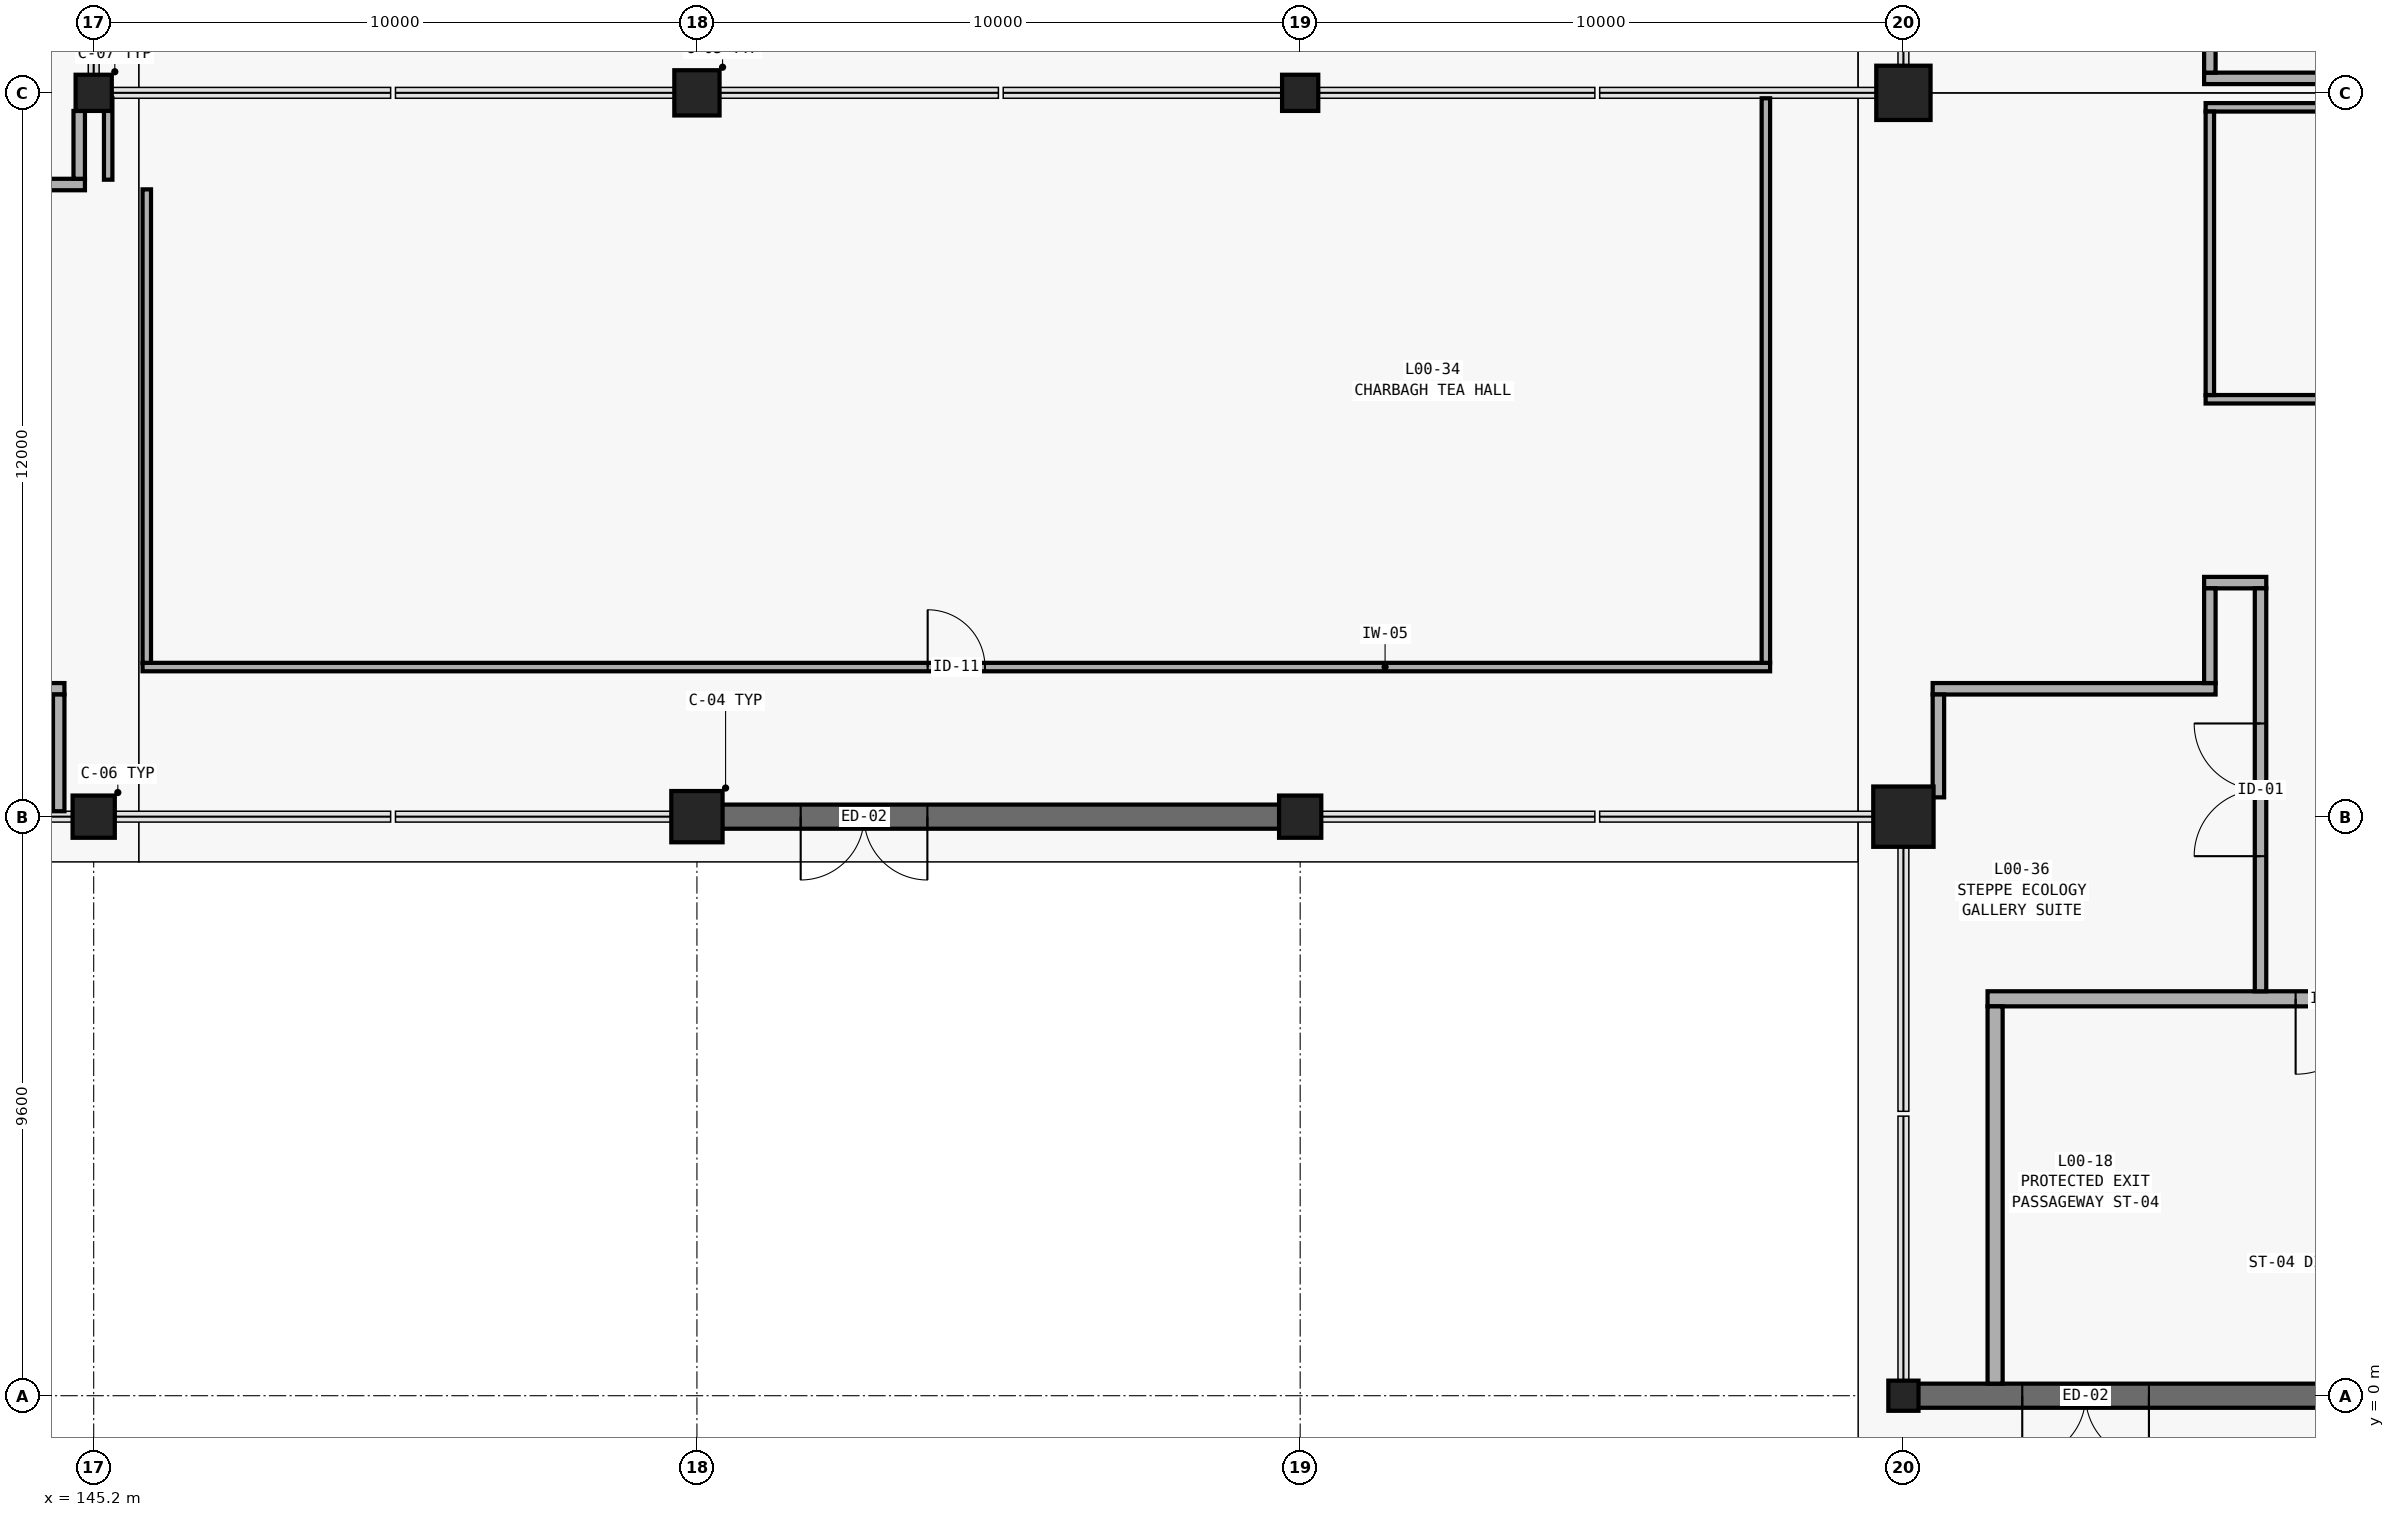
"""IFC4 building model, lengths in metres.
Left out: names, types, materials, properties, quantities, classifications, styles, units other than length and angle.
Written with IfcOpenShell. Run it as: python <this file> out.ifc"""

import sys

from ifc_helpers import new_model, si_unit, direction, frame, frame_2d, origin, origin_2d, place, context, subcontext, project, spatial, rectangle, extrude, element, fill, save


model = new_model("IFC4")
c1 = context("Model", 3, precision=1e-05, world=origin(), true_north=direction((0.0, 1.0)))
c2 = subcontext(c1, "Body", "Model", "MODEL_VIEW")
j1 = project(units=[si_unit("LENGTHUNIT", "METRE"), si_unit("PLANEANGLEUNIT", "RADIAN")], contexts=[c1])
p1 = place(None, origin())
s1 = spatial("IfcSite", under=j1, at=p1, CompositionType="ELEMENT")
p2 = place(p1, origin())
s2 = spatial("IfcBuilding", under=s1, at=p2, CompositionType="ELEMENT")
p3 = place(p2, origin())
s3 = spatial("IfcBuildingStorey", under=s2, at=p3, CompositionType="ELEMENT", Elevation=0.0)
p4 = place(p3, frame((145.2, 9.6, 0.0), z_axis=(0.0, 0.0, 1.0), x_axis=(1.0, 0.0, 0.0)))
e1 = element("IfcColumn", 1, at=p4, inside=s3, PredefinedType="COLUMN", context=c2, shape_type="SweptSolid", body=[
    extrude(rectangle(XDim=0.7, YDim=0.7, at=origin_2d()), origin(), (0.0, 0.0, 1.0), 4.8),
])
p5 = place(p3, frame((145.2, 21.6, 0.0), z_axis=(0.0, 0.0, 1.0), x_axis=(1.0, 0.0, 0.0)))
e2 = element("IfcColumn", 2, at=p5, inside=s3, PredefinedType="COLUMN", context=c2, shape_type="SweptSolid", body=[
    extrude(rectangle(XDim=0.6, YDim=0.6, at=origin_2d()), origin(), (0.0, 0.0, 1.0), 4.8),
])
p6 = place(p3, frame((155.2, 9.6, 0.0), z_axis=(0.0, 0.0, 1.0), x_axis=(1.0, 0.0, 0.0)))
e3 = element("IfcColumn", 3, at=p6, inside=s3, PredefinedType="COLUMN", context=c2, shape_type="SweptSolid", body=[
    extrude(rectangle(XDim=0.85, YDim=0.85, at=origin_2d()), origin(), (0.0, 0.0, 1.0), 4.8),
])
p7 = place(p3, frame((155.2, 21.6, 0.0), z_axis=(0.0, 0.0, 1.0), x_axis=(1.0, 0.0, 0.0)))
e4 = element("IfcColumn", 4, at=p7, inside=s3, PredefinedType="COLUMN", context=c2, shape_type="SweptSolid", body=[
    extrude(rectangle(XDim=0.75, YDim=0.75, at=origin_2d()), origin(), (0.0, 0.0, 1.0), 4.8),
])
p8 = place(p3, frame((165.2, 9.6, 0.0), z_axis=(0.0, 0.0, 1.0), x_axis=(1.0, 0.0, 0.0)))
e5 = element("IfcColumn", 5, at=p8, inside=s3, PredefinedType="COLUMN", context=c2, shape_type="SweptSolid", body=[
    extrude(rectangle(XDim=0.7, YDim=0.7, at=origin_2d()), origin(), (0.0, 0.0, 1.0), 4.8),
])
p9 = place(p3, frame((165.2, 21.6, 0.0), z_axis=(0.0, 0.0, 1.0), x_axis=(1.0, 0.0, 0.0)))
e6 = element("IfcColumn", 6, at=p9, inside=s3, PredefinedType="COLUMN", context=c2, shape_type="SweptSolid", body=[
    extrude(rectangle(XDim=0.6, YDim=0.6, at=origin_2d()), origin(), (0.0, 0.0, 1.0), 4.8),
])
p10 = place(p3, frame((175.2, 0.0, 0.0), z_axis=(0.0, 0.0, 1.0), x_axis=(1.0, 0.0, 0.0)))
e7 = element("IfcColumn", 7, at=p10, inside=s3, PredefinedType="COLUMN", context=c2, shape_type="SweptSolid", body=[
    extrude(rectangle(XDim=0.5, YDim=0.5, at=origin_2d()), origin(), (0.0, 0.0, 1.0), 4.8),
])
p11 = place(p3, frame((175.2, 9.6, 0.0), z_axis=(0.0, 0.0, 1.0), x_axis=(1.0, 0.0, 0.0)))
e8 = element("IfcColumn", 8, at=p11, inside=s3, PredefinedType="COLUMN", context=c2, shape_type="SweptSolid", body=[
    extrude(rectangle(XDim=1.0, YDim=1.0, at=origin_2d()), origin(), (0.0, 0.0, 1.0), 4.8),
])
p12 = place(p3, frame((175.2, 21.6, 0.0), z_axis=(0.0, 0.0, 1.0), x_axis=(1.0, 0.0, 0.0)))
e9 = element("IfcColumn", 9, at=p12, inside=s3, PredefinedType="COLUMN", context=c2, shape_type="SweptSolid", body=[
    extrude(rectangle(XDim=0.9, YDim=0.9, at=origin_2d()), origin(), (0.0, 0.0, 1.0), 4.8),
])
p13 = place(p3, frame((175.02, 0.0, 0.0), z_axis=(0.0, 0.0, 1.0), x_axis=(1.0, 0.0, 0.0)))
e10 = element("IfcWall", 10, at=p13, inside=s3, PredefinedType="STANDARD", context=c2, shape_type="SweptSolid", body=[
    extrude(rectangle(XDim=10.36, YDim=0.4, at=frame_2d((5.18, 0.0))), origin(), (0.0, 0.0, 1.0), 4.5),
])
p14 = place(p13, frame((2.15, 0.0, 0.0)))
e11 = element("IfcOpeningElement", 11, at=p14, cuts=e10, PredefinedType="OPENING", context=c2, shape_type="SweptSolid", body=[
    extrude(rectangle(XDim=2.1, YDim=2.6, at=frame_2d((1.05, 1.3))), frame((0.0, 0.215, 0.0), z_axis=(0.0, -1.0, 0.0), x_axis=(1.0, 0.0, 0.0)), (0.0, 0.0, 1.0), 0.43),
])
p15 = place(p3, frame((155.02, 9.6, 0.0), z_axis=(0.0, 0.0, 1.0), x_axis=(1.0, 0.0, 0.0)))
e12 = element("IfcWall", 12, at=p15, inside=s3, PredefinedType="STANDARD", context=c2, shape_type="SweptSolid", body=[
    extrude(rectangle(XDim=10.36, YDim=0.4, at=frame_2d((5.18, 0.0))), origin(), (0.0, 0.0, 1.0), 4.5),
])
p16 = place(p15, frame((1.9, 0.0, 0.0)))
e13 = element("IfcOpeningElement", 13, at=p16, cuts=e12, PredefinedType="OPENING", context=c2, shape_type="SweptSolid", body=[
    extrude(rectangle(XDim=2.1, YDim=2.6, at=frame_2d((1.05, 1.3))), frame((0.0, 0.215, 0.0), z_axis=(0.0, -1.0, 0.0), x_axis=(1.0, 0.0, 0.0)), (0.0, 0.0, 1.0), 0.43),
])
p17 = place(p3, frame((176.595, 6.58, 0.0), z_axis=(0.0, 0.0, 1.0), x_axis=(1.0, 0.0, 0.0)))
e14 = element("IfcWall", 14, at=p17, inside=s3, PredefinedType="PARTITIONING", context=c2, shape_type="SweptSolid", body=[
    extrude(rectangle(XDim=9.245, YDim=0.25, at=frame_2d((4.623, 0.0))), origin(), (0.0, 0.0, 1.0), 3.38),
])
p18 = place(p17, frame((5.107, 0.0, 0.0)))
e15 = element("IfcOpeningElement", 15, at=p18, cuts=e14, PredefinedType="OPENING", context=c2, shape_type="SweptSolid", body=[
    extrude(rectangle(XDim=1.25, YDim=2.15, at=frame_2d((0.625, 1.075))), frame((0.0, 0.14, 0.0), z_axis=(0.0, -1.0, 0.0), x_axis=(1.0, 0.0, 0.0)), (0.0, 0.0, 1.0), 0.28),
])
p19 = place(p3, frame((141.425, 11.72, 0.0), z_axis=(0.0, 0.0, 1.0), x_axis=(1.0, 0.0, 0.0)))
e16 = element("IfcWall", 16, at=p19, inside=s3, PredefinedType="PARTITIONING", context=c2, shape_type="SweptSolid", body=[
    extrude(rectangle(XDim=3.29, YDim=0.19, at=frame_2d((1.645, 0.0))), origin(), (0.0, 0.0, 1.0), 3.38),
])
p20 = place(p3, frame((175.685, 11.72, 0.0), z_axis=(0.0, 0.0, 1.0), x_axis=(1.0, 0.0, 0.0)))
e17 = element("IfcWall", 17, at=p20, inside=s3, PredefinedType="PARTITIONING", context=c2, shape_type="SweptSolid", body=[
    extrude(rectangle(XDim=4.69, YDim=0.19, at=frame_2d((2.345, 0.0))), origin(), (0.0, 0.0, 1.0), 3.38),
])
p21 = place(p3, frame((146.01, 12.08, 0.0), z_axis=(0.0, 0.0, 1.0), x_axis=(1.0, 0.0, 0.0)))
e18 = element("IfcWall", 18, at=p21, inside=s3, PredefinedType="PARTITIONING", context=c2, shape_type="SweptSolid", body=[
    extrude(rectangle(XDim=26.98, YDim=0.14, at=frame_2d((13.49, 0.0))), origin(), (0.0, 0.0, 1.0), 3.38),
])
p22 = place(p21, frame((13.015, 0.0, 0.0)))
e19 = element("IfcOpeningElement", 19, at=p22, cuts=e18, PredefinedType="OPENING", context=c2, shape_type="SweptSolid", body=[
    extrude(rectangle(XDim=0.95, YDim=2.15, at=frame_2d((0.475, 1.075))), frame((0.0, 0.085, 0.0), z_axis=(0.0, -1.0, 0.0), x_axis=(1.0, 0.0, 0.0)), (0.0, 0.0, 1.0), 0.17),
])
p23 = place(p3, frame((180.185, 13.48, 0.0), z_axis=(0.0, 0.0, 1.0), x_axis=(1.0, 0.0, 0.0)))
e20 = element("IfcWall", 20, at=p23, inside=s3, PredefinedType="PARTITIONING", context=c2, shape_type="SweptSolid", body=[
    extrude(rectangle(XDim=1.03, YDim=0.19, at=frame_2d((0.515, 0.0))), origin(), (0.0, 0.0, 1.0), 3.38),
])
p24 = place(p3, frame((180.21, 16.52, 0.0), z_axis=(0.0, 0.0, 1.0), x_axis=(1.0, 0.0, 0.0)))
e21 = element("IfcWall", 21, at=p24, inside=s3, PredefinedType="PARTITIONING", context=c2, shape_type="SweptSolid", body=[
    extrude(rectangle(XDim=20.93, YDim=0.14, at=frame_2d((10.465, 0.0))), origin(), (0.0, 0.0, 1.0), 3.38),
])
p25 = place(p24, frame((16.219, 0.0, 0.0)))
e22 = element("IfcOpeningElement", 22, at=p25, cuts=e21, PredefinedType="OPENING", context=c2, shape_type="SweptSolid", body=[
    extrude(rectangle(XDim=1.05, YDim=2.1, at=frame_2d((0.525, 1.05))), frame((0.0, 0.085, 0.0), z_axis=(0.0, -1.0, 0.0), x_axis=(1.0, 0.0, 0.0)), (0.0, 0.0, 1.0), 0.17),
])
p26 = place(p24, frame((9.965, 0.0, 0.0)))
e23 = element("IfcOpeningElement", 23, at=p26, cuts=e21, PredefinedType="OPENING", context=c2, shape_type="SweptSolid", body=[
    extrude(rectangle(XDim=1.0, YDim=2.15, at=frame_2d((0.5, 1.075))), frame((0.0, 0.085, 0.0), z_axis=(0.0, -1.0, 0.0), x_axis=(1.0, 0.0, 0.0)), (0.0, 0.0, 1.0), 0.17),
])
p27 = place(p3, frame((141.425, 20.08, 0.0), z_axis=(0.0, 0.0, 1.0), x_axis=(1.0, 0.0, 0.0)))
e24 = element("IfcWall", 24, at=p27, inside=s3, PredefinedType="PARTITIONING", context=c2, shape_type="SweptSolid", body=[
    extrude(rectangle(XDim=3.63, YDim=0.19, at=frame_2d((1.815, 0.0))), origin(), (0.0, 0.0, 1.0), 3.38),
])
p28 = place(p3, frame((180.21, 21.36, 0.0), z_axis=(0.0, 0.0, 1.0), x_axis=(1.0, 0.0, 0.0)))
e25 = element("IfcWall", 25, at=p28, inside=s3, PredefinedType="PARTITIONING", context=c2, shape_type="SweptSolid", body=[
    extrude(rectangle(XDim=4.54, YDim=0.14, at=frame_2d((2.27, 0.0))), origin(), (0.0, 0.0, 1.0), 3.38),
])
p29 = place(p3, frame((180.185, 21.84, 0.0), z_axis=(0.0, 0.0, 1.0), x_axis=(1.0, 0.0, 0.0)))
e26 = element("IfcWall", 26, at=p29, inside=s3, PredefinedType="PARTITIONING", context=c2, shape_type="SweptSolid", body=[
    extrude(rectangle(XDim=4.565, YDim=0.19, at=frame_2d((2.282, 0.0))), origin(), (0.0, 0.0, 1.0), 3.38),
])
p30 = place(p3, frame((144.62, 9.69, 0.0), z_axis=(0.0, 0.0, 1.0), x_axis=(0.0, 1.0, 0.0)))
e27 = element("IfcWall", 27, at=p30, inside=s3, PredefinedType="PARTITIONING", context=c2, shape_type="SweptSolid", body=[
    extrude(rectangle(XDim=1.935, YDim=0.19, at=frame_2d((0.968, 0.0))), origin(), (0.0, 0.0, 1.0), 3.38),
])
p31 = place(p3, frame((144.96, 20.175, 0.0), z_axis=(0.0, 0.0, 1.0), x_axis=(0.0, 1.0, 0.0)))
e28 = element("IfcWall", 28, at=p31, inside=s3, PredefinedType="PARTITIONING", context=c2, shape_type="SweptSolid", body=[
    extrude(rectangle(XDim=1.125, YDim=0.19, at=frame_2d((0.562, 0.0))), origin(), (0.0, 0.0, 1.0), 3.38),
])
p32 = place(p3, frame((145.44, 20.16, 0.0), z_axis=(0.0, 0.0, 1.0), x_axis=(0.0, 1.0, 0.0)))
e29 = element("IfcWall", 29, at=p32, inside=s3, PredefinedType="PARTITIONING", context=c2, shape_type="SweptSolid", body=[
    extrude(rectangle(XDim=1.35, YDim=0.14, at=frame_2d((0.675, 0.0))), origin(), (0.0, 0.0, 1.0), 3.38),
])
p33 = place(p3, frame((146.08, 12.15, 0.0), z_axis=(0.0, 0.0, 1.0), x_axis=(0.0, 1.0, 0.0)))
e30 = element("IfcWall", 30, at=p33, inside=s3, PredefinedType="PARTITIONING", context=c2, shape_type="SweptSolid", body=[
    extrude(rectangle(XDim=7.85, YDim=0.14, at=frame_2d((3.925, 0.0))), origin(), (0.0, 0.0, 1.0), 3.38),
])
p34 = place(p3, frame((172.92, 12.15, 0.0), z_axis=(0.0, 0.0, 1.0), x_axis=(0.0, 1.0, 0.0)))
e31 = element("IfcWall", 31, at=p34, inside=s3, PredefinedType="PARTITIONING", context=c2, shape_type="SweptSolid", body=[
    extrude(rectangle(XDim=9.36, YDim=0.14, at=frame_2d((4.68, 0.0))), origin(), (0.0, 0.0, 1.0), 3.38),
])
p35 = place(p3, frame((175.78, 9.92, 0.0), z_axis=(0.0, 0.0, 1.0), x_axis=(0.0, 1.0, 0.0)))
e32 = element("IfcWall", 32, at=p35, inside=s3, PredefinedType="PARTITIONING", context=c2, shape_type="SweptSolid", body=[
    extrude(rectangle(XDim=1.705, YDim=0.19, at=frame_2d((0.853, 0.0))), origin(), (0.0, 0.0, 1.0), 3.38),
])
p36 = place(p3, frame((176.72, 0.2, 0.0), z_axis=(0.0, 0.0, 1.0), x_axis=(0.0, 1.0, 0.0)))
e33 = element("IfcWall", 33, at=p36, inside=s3, PredefinedType="PARTITIONING", context=c2, shape_type="SweptSolid", body=[
    extrude(rectangle(XDim=6.255, YDim=0.25, at=frame_2d((3.127, 0.0))), origin(), (0.0, 0.0, 1.0), 3.38),
])
p37 = place(p3, frame((180.28, 11.815, 0.0), z_axis=(0.0, 0.0, 1.0), x_axis=(0.0, 1.0, 0.0)))
e34 = element("IfcWall", 34, at=p37, inside=s3, PredefinedType="PARTITIONING", context=c2, shape_type="SweptSolid", body=[
    extrude(rectangle(XDim=1.57, YDim=0.19, at=frame_2d((0.785, 0.0))), origin(), (0.0, 0.0, 1.0), 3.38),
])
p38 = place(p3, frame((180.28, 16.59, 0.0), z_axis=(0.0, 0.0, 1.0), x_axis=(0.0, 1.0, 0.0)))
e35 = element("IfcWall", 35, at=p38, inside=s3, PredefinedType="PARTITIONING", context=c2, shape_type="SweptSolid", body=[
    extrude(rectangle(XDim=4.7, YDim=0.14, at=frame_2d((2.35, 0.0))), origin(), (0.0, 0.0, 1.0), 3.38),
])
p39 = place(p3, frame((180.28, 21.935, 0.0), z_axis=(0.0, 0.0, 1.0), x_axis=(0.0, 1.0, 0.0)))
e36 = element("IfcWall", 36, at=p39, inside=s3, PredefinedType="PARTITIONING", context=c2, shape_type="SweptSolid", body=[
    extrude(rectangle(XDim=17.25, YDim=0.19, at=frame_2d((8.625, 0.0))), origin(), (0.0, 0.0, 1.0), 3.38),
])
p40 = place(p3, frame((181.12, 6.705, 0.0), z_axis=(0.0, 0.0, 1.0), x_axis=(0.0, 1.0, 0.0)))
e37 = element("IfcWall", 37, at=p40, inside=s3, PredefinedType="PARTITIONING", context=c2, shape_type="SweptSolid", body=[
    extrude(rectangle(XDim=6.68, YDim=0.19, at=frame_2d((3.34, 0.0))), origin(), (0.0, 0.0, 1.0), 3.38),
])
p41 = place(p40, frame((2.24, 0.0, 0.0)))
e38 = element("IfcOpeningElement", 38, at=p41, cuts=e37, PredefinedType="OPENING", context=c2, shape_type="SweptSolid", body=[
    extrude(rectangle(XDim=2.2, YDim=2.45, at=frame_2d((1.1, 1.225))), frame((0.0, 0.11, 0.0), z_axis=(0.0, -1.0, 0.0), x_axis=(1.0, 0.0, 0.0)), (0.0, 0.0, 1.0), 0.22),
])
p42 = place(p14, frame((2.1, 0.0, 0.0), z_axis=(0.0, 0.0, 1.0), x_axis=(-1.0, 0.0, 0.0)))
e39 = element("IfcDoor", 39, at=p42, inside=s3, OperationType="DOUBLE_DOOR_SINGLE_SWING", PredefinedType="DOOR", context=c2, shape_type="SweptSolid", body=[
    extrude(rectangle(XDim=2.1, YDim=2.6, at=frame_2d((1.05, 1.3))), frame((0.0, 0.025, 0.0), z_axis=(0.0, -1.0, 0.0), x_axis=(1.0, 0.0, 0.0)), (0.0, 0.0, 1.0), 0.05),
])
fill(e11, e39)
p43 = place(p16, frame((2.1, 0.0, 0.0), z_axis=(0.0, 0.0, 1.0), x_axis=(-1.0, 0.0, 0.0)))
e40 = element("IfcDoor", 40, at=p43, inside=s3, OperationType="DOUBLE_DOOR_SINGLE_SWING", PredefinedType="DOOR", context=c2, shape_type="SweptSolid", body=[
    extrude(rectangle(XDim=2.1, YDim=2.6, at=frame_2d((1.05, 1.3))), frame((0.0, 0.025, 0.0), z_axis=(0.0, -1.0, 0.0), x_axis=(1.0, 0.0, 0.0)), (0.0, 0.0, 1.0), 0.05),
])
fill(e13, e40)
p44 = place(p18, frame((1.25, 0.0, 0.0), z_axis=(0.0, 0.0, 1.0), x_axis=(-1.0, 0.0, 0.0)))
e41 = element("IfcDoor", 41, at=p44, inside=s3, OperationType="SINGLE_SWING_LEFT", PredefinedType="DOOR", context=c2, shape_type="SweptSolid", body=[
    extrude(rectangle(XDim=1.25, YDim=2.15, at=frame_2d((0.625, 1.075))), frame((0.0, 0.025, 0.0), z_axis=(0.0, -1.0, 0.0), x_axis=(1.0, 0.0, 0.0)), (0.0, 0.0, 1.0), 0.05),
])
fill(e15, e41)
p45 = place(p22, origin())
e42 = element("IfcDoor", 42, at=p45, inside=s3, OperationType="SINGLE_SWING_LEFT", PredefinedType="DOOR", context=c2, shape_type="SweptSolid", body=[
    extrude(rectangle(XDim=0.95, YDim=2.15, at=frame_2d((0.475, 1.075))), frame((0.0, 0.025, 0.0), z_axis=(0.0, -1.0, 0.0), x_axis=(1.0, 0.0, 0.0)), (0.0, 0.0, 1.0), 0.05),
])
fill(e19, e42)
p46 = place(p41, origin())
e43 = element("IfcDoor", 43, at=p46, inside=s3, OperationType="DOUBLE_DOOR_SINGLE_SWING", PredefinedType="DOOR", context=c2, shape_type="SweptSolid", body=[
    extrude(rectangle(XDim=2.2, YDim=2.45, at=frame_2d((1.1, 1.225))), frame((0.0, 0.025, 0.0), z_axis=(0.0, -1.0, 0.0), x_axis=(1.0, 0.0, 0.0)), (0.0, 0.0, 1.0), 0.05),
])
fill(e38, e43)
save(model, sys.argv[1])
